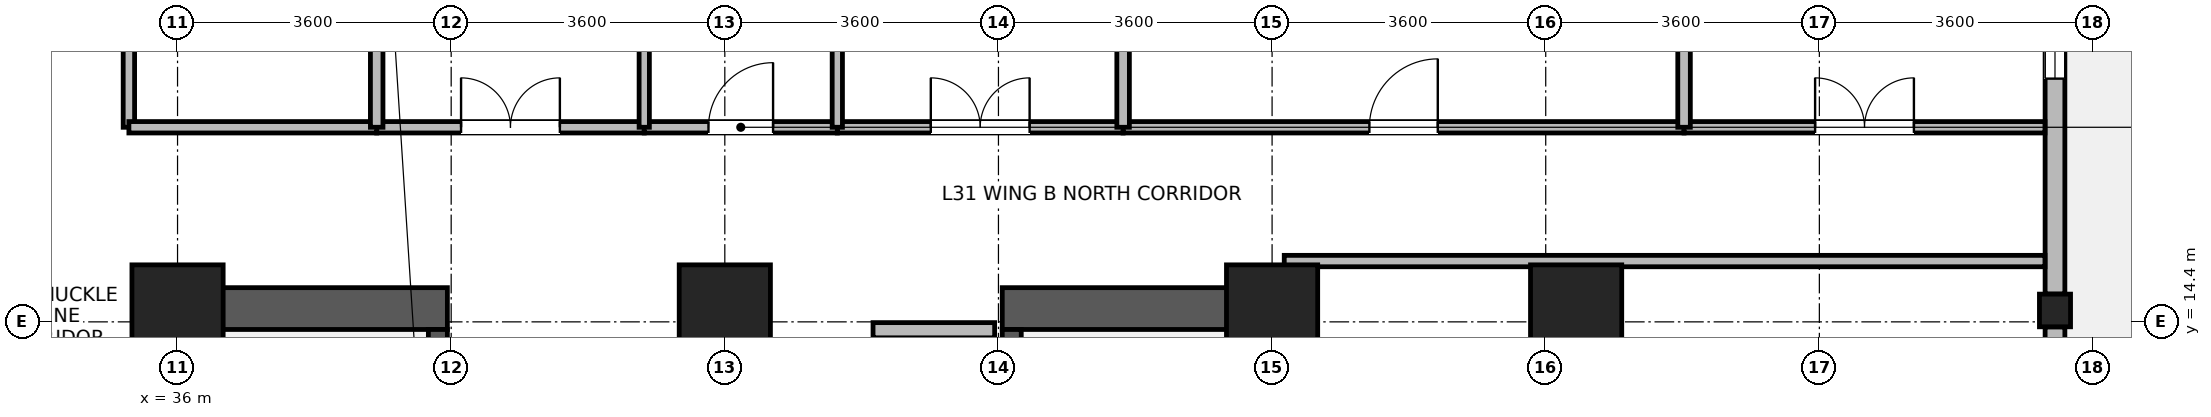
"""IFC4 building model, lengths in metres.
Left out: names, types, materials, properties, quantities, classifications, styles, units other than length and angle.
Written with IfcOpenShell. Run it as: python <this file> out.ifc"""

import sys

from ifc_helpers import new_model, si_unit, direction, frame, frame_2d, origin, origin_2d, place, context, subcontext, project, spatial, rectangle, i_section, extrude, source, transform, mapped, element, fill, save


model = new_model("IFC4")
c1 = context("Model", 3, precision=1e-05, world=origin(), true_north=direction((0.0, 1.0)))
c2 = subcontext(c1, "Body", "Model", "MODEL_VIEW")
j1 = project(units=[si_unit("LENGTHUNIT", "METRE"), si_unit("PLANEANGLEUNIT", "RADIAN")], contexts=[c1])
p1 = place(None, origin())
s1 = spatial("IfcSite", under=j1, at=p1, CompositionType="ELEMENT")
p2 = place(p1, origin())
s2 = spatial("IfcBuilding", under=s1, at=p2, CompositionType="ELEMENT")
p3 = place(p2, frame((0.0, 0.0, 123.0)))
s3 = spatial("IfcBuildingStorey", under=s2, at=p3, CompositionType="ELEMENT", Elevation=123.0)
for number, where, z_axis, x_axis in (
    (1, (36.075, 6.75, 0.0), (0.0, 0.0, 1.0), (0.0, 1.0, 0.0)),
    (2, (50.325, 6.75, 0.0), (0.0, 0.0, 1.0), (0.0, 1.0, 0.0)),
):
    element("IfcWall", number, at=place(p3, frame(where, z_axis=z_axis, x_axis=x_axis)), inside=s3, PredefinedType="SHEAR", context=c2, shape_type="SweptSolid", body=[
        extrude(rectangle(XDim=8.1, YDim=0.55, at=frame_2d((4.05, 0.0))), origin(), (0.0, 0.0, 1.0), 3.45),
    ])
for number, where, z_axis, x_axis in (
    (3, (36.35, 14.575, 0.0), (0.0, 0.0, 1.0), (1.0, 0.0, 0.0)),
    (4, (46.85, 14.575, 0.0), (0.0, 0.0, 1.0), (1.0, 0.0, 0.0)),
):
    element("IfcWall", number, at=place(p3, frame(where, z_axis=z_axis, x_axis=x_axis)), inside=s3, PredefinedType="SHEAR", context=c2, shape_type="SweptSolid", body=[
        extrude(rectangle(XDim=3.2, YDim=0.55, at=frame_2d((1.6, 0.0))), origin(), (0.0, 0.0, 1.0), 3.45),
    ])
p4 = place(p3, frame((39.425, 7.3, 0.0), z_axis=(0.0, 0.0, 1.0), x_axis=(0.0, 1.0, 0.0)))
e5 = element("IfcWall", 5, at=p4, inside=s3, PredefinedType="SHEAR", context=c2, shape_type="SweptSolid", body=[
    extrude(rectangle(XDim=7.0, YDim=0.25, at=frame_2d((3.5, 0.0))), origin(), (0.0, 0.0, 1.0), 3.45),
])
p5 = place(p4, frame((0.15, 0.0, 0.0)))
e6 = element("IfcOpeningElement", 6, at=p5, cuts=e5, PredefinedType="OPENING", context=c2, shape_type="SweptSolid", body=[
    extrude(rectangle(XDim=1.1, YDim=2.08, at=frame_2d((0.55, 1.04))), frame((0.0, 0.135, 0.0), z_axis=(0.0, -1.0, 0.0), x_axis=(1.0, 0.0, 0.0)), (0.0, 0.0, 1.0), 0.27),
])
p6 = place(p3, frame((46.975, 7.3, 0.0), z_axis=(0.0, 0.0, 1.0), x_axis=(0.0, 1.0, 0.0)))
e7 = element("IfcWall", 7, at=p6, inside=s3, PredefinedType="SHEAR", context=c2, shape_type="SweptSolid", body=[
    extrude(rectangle(XDim=7.0, YDim=0.25, at=frame_2d((3.5, 0.0))), origin(), (0.0, 0.0, 1.0), 3.45),
])
p7 = place(p6, frame((0.15, 0.0, 0.0)))
e8 = element("IfcOpeningElement", 8, at=p7, cuts=e7, PredefinedType="OPENING", context=c2, shape_type="SweptSolid", body=[
    extrude(rectangle(XDim=1.1, YDim=2.08, at=frame_2d((0.55, 1.04))), frame((0.0, 0.135, 0.0), z_axis=(0.0, -1.0, 0.0), x_axis=(1.0, 0.0, 0.0)), (0.0, 0.0, 1.0), 0.27),
])
m1 = source(origin(), c2, "Body", "SweptSolid", [
    extrude(rectangle(XDim=1.2, YDim=1.2, at=origin_2d()), origin(), (0.0, 0.0, 1.0), 3.7),
])
for number, where, z_axis, x_axis in (
    (9, (36.0, 14.55, 0.0), (0.0, 0.0, 1.0), (1.0, 0.0, 0.0)),
    (10, (43.2, 14.55, 0.0), (0.0, 0.0, 1.0), (1.0, 0.0, 0.0)),
    (11, (50.4, 14.55, 0.0), (0.0, 0.0, 1.0), (1.0, 0.0, 0.0)),
    (12, (54.4, 14.55, 0.0), (0.0, 0.0, 1.0), (1.0, 0.0, 0.0)),
):
    element("IfcColumn", number, at=place(p3, frame(where, z_axis=z_axis, x_axis=x_axis)), inside=s3, PredefinedType="COLUMN", context=c2, shape_type="MappedRepresentation", body=[
        mapped(m1, transform((0.0, 0.0, 0.0), x_axis=(1.0, 0.0, 0.0), y_axis=(0.0, 1.0, 0.0), z_axis=(0.0, 0.0, 1.0), scale=1.0)),
    ])
m2 = source(origin(), c2, "Body", "SweptSolid", [
    extrude(i_section(OverallWidth=0.409, OverallDepth=0.43, WebThickness=0.024, FlangeThickness=0.033, FilletRadius=0.015, at=origin_2d()), origin(), (0.0, 0.0, 1.0), 3.7),
])
p8 = place(p3, frame((60.7, 14.55, 0.0), z_axis=(0.0, 0.0, 1.0), x_axis=(1.0, 0.0, 0.0)))
e13 = element("IfcColumn", 13, at=p8, inside=s3, PredefinedType="COLUMN", context=c2, shape_type="MappedRepresentation", body=[
    mapped(m2, transform((0.0, 0.0, 0.0), x_axis=(1.0, 0.0, 0.0), y_axis=(0.0, 1.0, 0.0), z_axis=(0.0, 0.0, 1.0), scale=1.0)),
])
p9 = place(p3, frame((60.7, 14.334, 0.0), z_axis=(0.0, 0.0, 1.0), x_axis=(0.0, -1.0, 0.0)))
e14 = element("IfcWall", 14, at=p9, inside=s3, PredefinedType="STANDARD", context=c2, shape_type="SweptSolid", body=[
    extrude(rectangle(XDim=7.068, YDim=0.26, at=frame_2d((3.534, 0.0))), origin(), (0.0, 0.0, 1.0), 2.98),
])
p10 = place(p9, frame((2.784, 0.0, 0.0)))
e15 = element("IfcOpeningElement", 15, at=p10, cuts=e14, PredefinedType="OPENING", context=c2, shape_type="SweptSolid", body=[
    extrude(rectangle(XDim=1.5, YDim=2.15, at=frame_2d((0.75, 1.075))), frame((0.0, 0.14, 0.0), z_axis=(0.0, -1.0, 0.0), x_axis=(1.0, 0.0, 0.0)), (0.0, 0.0, 1.0), 0.28),
])
p11 = place(p9, frame((1.017, 0.0, 0.85)))
e16 = element("IfcOpeningElement", 16, at=p11, cuts=e14, PredefinedType="OPENING", context=c2, shape_type="SweptSolid", body=[
    extrude(rectangle(XDim=1.5, YDim=1.85, at=frame_2d((0.75, 0.925))), frame((0.0, 0.14, 0.0), z_axis=(0.0, -1.0, 0.0), x_axis=(1.0, 0.0, 0.0)), (0.0, 0.0, 1.0), 0.28),
])
p12 = place(p9, frame((4.551, 0.0, 0.85)))
e17 = element("IfcOpeningElement", 17, at=p12, cuts=e14, PredefinedType="OPENING", context=c2, shape_type="SweptSolid", body=[
    extrude(rectangle(XDim=1.5, YDim=1.85, at=frame_2d((0.75, 0.925))), frame((0.0, 0.14, 0.0), z_axis=(0.0, -1.0, 0.0), x_axis=(1.0, 0.0, 0.0)), (0.0, 0.0, 1.0), 0.28),
])
p13 = place(p3, frame((60.7, 21.384, 0.0), z_axis=(0.0, 0.0, 1.0), x_axis=(0.0, -1.0, 0.0)))
e18 = element("IfcWall", 18, at=p13, inside=s3, PredefinedType="STANDARD", context=c2, shape_type="SweptSolid", body=[
    extrude(rectangle(XDim=6.618, YDim=0.26, at=frame_2d((3.309, 0.0))), origin(), (0.0, 0.0, 1.0), 2.98),
])
p14 = place(p13, frame((0.905, 0.0, 0.85)))
e19 = element("IfcOpeningElement", 19, at=p14, cuts=e18, PredefinedType="OPENING", context=c2, shape_type="SweptSolid", body=[
    extrude(rectangle(XDim=1.5, YDim=1.85, at=frame_2d((0.75, 0.925))), frame((0.0, 0.14, 0.0), z_axis=(0.0, -1.0, 0.0), x_axis=(1.0, 0.0, 0.0)), (0.0, 0.0, 1.0), 0.28),
])
p15 = place(p13, frame((2.834, 0.0, 0.85)))
e20 = element("IfcOpeningElement", 20, at=p15, cuts=e18, PredefinedType="OPENING", context=c2, shape_type="SweptSolid", body=[
    extrude(rectangle(XDim=0.95, YDim=1.75, at=frame_2d((0.475, 0.875))), frame((0.0, 0.14, 0.0), z_axis=(0.0, -1.0, 0.0), x_axis=(1.0, 0.0, 0.0)), (0.0, 0.0, 1.0), 0.28),
])
p16 = place(p3, frame((45.15, 14.29, 0.0), z_axis=(0.0, 0.0, 1.0), x_axis=(1.0, 0.0, 0.0)))
e21 = element("IfcWall", 21, at=p16, inside=s3, PredefinedType="PARTITIONING", context=c2, shape_type="SweptSolid", body=[
    extrude(rectangle(XDim=1.6, YDim=0.2, at=frame_2d((0.8, 0.0))), origin(), (0.0, 0.0, 1.0), 2.43),
])
p17 = place(p3, frame((50.56, 15.2, 0.0), z_axis=(0.0, 0.0, 1.0), x_axis=(1.0, 0.0, 0.0)))
e22 = element("IfcWall", 22, at=p17, inside=s3, PredefinedType="PARTITIONING", context=c2, shape_type="SweptSolid", body=[
    extrude(rectangle(XDim=10.008, YDim=0.15, at=frame_2d((5.004, 0.0))), origin(), (0.0, 0.0, 1.0), 3.43),
])
p18 = place(p3, frame((35.36, 16.96, 0.0), z_axis=(0.0, 0.0, 1.0), x_axis=(0.0, 1.0, 0.0)))
e23 = element("IfcWall", 23, at=p18, inside=s3, PredefinedType="PARTITIONING", context=c2, shape_type="SweptSolid", body=[
    extrude(rectangle(XDim=9.64, YDim=0.15, at=frame_2d((4.82, 0.0))), origin(), (0.0, 0.0, 1.0), 3.43),
])
p19 = place(p18, frame((2.435, 0.0, 0.0)))
e24 = element("IfcOpeningElement", 24, at=p19, cuts=e23, PredefinedType="OPENING", context=c2, shape_type="SweptSolid", body=[
    extrude(rectangle(XDim=1.3, YDim=2.12, at=frame_2d((0.65, 1.06))), frame((0.0, 0.085, 0.0), z_axis=(0.0, -1.0, 0.0), x_axis=(1.0, 0.0, 0.0)), (0.0, 0.0, 1.0), 0.17),
])
p20 = place(p3, frame((48.44, 16.96, 0.0), z_axis=(0.0, 0.0, 1.0), x_axis=(1.0, 0.0, 0.0)))
e25 = element("IfcWall", 25, at=p20, inside=s3, PredefinedType="PARTITIONING", context=c2, shape_type="SweptSolid", body=[
    extrude(rectangle(XDim=7.38, YDim=0.15, at=frame_2d((3.69, 0.0))), origin(), (0.0, 0.0, 1.0), 3.43),
])
p21 = place(p20, frame((3.24, 0.0, 0.0)))
e26 = element("IfcOpeningElement", 26, at=p21, cuts=e25, PredefinedType="OPENING", context=c2, shape_type="SweptSolid", body=[
    extrude(rectangle(XDim=0.9, YDim=2.08, at=frame_2d((0.45, 1.04))), frame((0.0, 0.085, 0.0), z_axis=(0.0, -1.0, 0.0), x_axis=(1.0, 0.0, 0.0)), (0.0, 0.0, 1.0), 0.17),
])
p22 = place(p3, frame((55.82, 16.96, 0.0), z_axis=(0.0, 0.0, 1.0), x_axis=(1.0, 0.0, 0.0)))
e27 = element("IfcWall", 27, at=p22, inside=s3, PredefinedType="PARTITIONING", context=c2, shape_type="SweptSolid", body=[
    extrude(rectangle(XDim=4.748, YDim=0.15, at=frame_2d((2.374, 0.0))), origin(), (0.0, 0.0, 1.0), 3.43),
])
p23 = place(p22, frame((1.724, 0.0, 0.0)))
e28 = element("IfcOpeningElement", 28, at=p23, cuts=e27, PredefinedType="OPENING", context=c2, shape_type="SweptSolid", body=[
    extrude(rectangle(XDim=1.3, YDim=2.12, at=frame_2d((0.65, 1.06))), frame((0.0, 0.085, 0.0), z_axis=(0.0, -1.0, 0.0), x_axis=(1.0, 0.0, 0.0)), (0.0, 0.0, 1.0), 0.17),
])
p24 = place(p3, frame((44.68, 16.96, 0.0), z_axis=(0.0, 0.0, 1.0), x_axis=(1.0, 0.0, 0.0)))
e29 = element("IfcWall", 29, at=p24, inside=s3, PredefinedType="PARTITIONING", context=c2, shape_type="SweptSolid", body=[
    extrude(rectangle(XDim=3.76, YDim=0.15, at=frame_2d((1.88, 0.0))), origin(), (0.0, 0.0, 1.0), 3.43),
])
p25 = place(p24, frame((1.23, 0.0, 0.0)))
e30 = element("IfcOpeningElement", 30, at=p25, cuts=e29, PredefinedType="OPENING", context=c2, shape_type="SweptSolid", body=[
    extrude(rectangle(XDim=1.3, YDim=2.12, at=frame_2d((0.65, 1.06))), frame((0.0, 0.085, 0.0), z_axis=(0.0, -1.0, 0.0), x_axis=(1.0, 0.0, 0.0)), (0.0, 0.0, 1.0), 0.17),
])
p26 = place(p3, frame((38.62, 16.96, 0.0), z_axis=(0.0, 0.0, 1.0), x_axis=(1.0, 0.0, 0.0)))
e31 = element("IfcWall", 31, at=p26, inside=s3, PredefinedType="PARTITIONING", context=c2, shape_type="SweptSolid", body=[
    extrude(rectangle(XDim=3.52, YDim=0.15, at=frame_2d((1.76, 0.0))), origin(), (0.0, 0.0, 1.0), 3.43),
])
p27 = place(p26, frame((1.11, 0.0, 0.0)))
e32 = element("IfcOpeningElement", 32, at=p27, cuts=e31, PredefinedType="OPENING", context=c2, shape_type="SweptSolid", body=[
    extrude(rectangle(XDim=1.3, YDim=2.12, at=frame_2d((0.65, 1.06))), frame((0.0, 0.085, 0.0), z_axis=(0.0, -1.0, 0.0), x_axis=(1.0, 0.0, 0.0)), (0.0, 0.0, 1.0), 0.17),
])
p28 = place(p3, frame((35.36, 16.96, 0.0), z_axis=(0.0, 0.0, 1.0), x_axis=(1.0, 0.0, 0.0)))
e33 = element("IfcWall", 33, at=p28, inside=s3, PredefinedType="PARTITIONING", context=c2, shape_type="SweptSolid", body=[
    extrude(rectangle(XDim=3.26, YDim=0.15, at=frame_2d((1.63, 0.0))), origin(), (0.0, 0.0, 1.0), 3.43),
])
p29 = place(p3, frame((42.14, 16.96, 0.0), z_axis=(0.0, 0.0, 1.0), x_axis=(1.0, 0.0, 0.0)))
e34 = element("IfcWall", 34, at=p29, inside=s3, PredefinedType="PARTITIONING", context=c2, shape_type="SweptSolid", body=[
    extrude(rectangle(XDim=2.54, YDim=0.15, at=frame_2d((1.27, 0.0))), origin(), (0.0, 0.0, 1.0), 3.43),
])
p30 = place(p29, frame((0.845, 0.0, 0.0)))
e35 = element("IfcOpeningElement", 35, at=p30, cuts=e34, PredefinedType="OPENING", context=c2, shape_type="SweptSolid", body=[
    extrude(rectangle(XDim=0.85, YDim=2.04, at=frame_2d((0.425, 1.02))), frame((0.0, 0.085, 0.0), z_axis=(0.0, -1.0, 0.0), x_axis=(1.0, 0.0, 0.0)), (0.0, 0.0, 1.0), 0.17),
])
p31 = place(p3, frame((38.62, 16.96, 0.0), z_axis=(0.0, 0.0, 1.0), x_axis=(0.0, 1.0, 0.0)))
e36 = element("IfcWall", 36, at=p31, inside=s3, PredefinedType="PARTITIONING", context=c2, shape_type="SweptSolid", body=[
    extrude(rectangle(XDim=9.64, YDim=0.165, at=frame_2d((4.82, 0.0))), origin(), (0.0, 0.0, 1.0), 3.43),
])
for number, where, z_axis, x_axis in (
    (37, (42.14, 16.96, 0.0), (0.0, 0.0, 1.0), (0.0, 1.0, 0.0)),
    (38, (44.68, 16.96, 0.0), (0.0, 0.0, 1.0), (0.0, 1.0, 0.0)),
):
    element("IfcWall", number, at=place(p3, frame(where, z_axis=z_axis, x_axis=x_axis)), inside=s3, PredefinedType="PARTITIONING", context=c2, shape_type="SweptSolid", body=[
        extrude(rectangle(XDim=9.64, YDim=0.135, at=frame_2d((4.82, 0.0))), origin(), (0.0, 0.0, 1.0), 3.43),
    ])
for number, where, z_axis, x_axis in (
    (39, (48.44, 16.96, 0.0), (0.0, 0.0, 1.0), (0.0, 1.0, 0.0)),
    (40, (55.82, 16.96, 0.0), (0.0, 0.0, 1.0), (0.0, 1.0, 0.0)),
):
    element("IfcWall", number, at=place(p3, frame(where, z_axis=z_axis, x_axis=x_axis)), inside=s3, PredefinedType="PARTITIONING", context=c2, shape_type="SweptSolid", body=[
        extrude(rectangle(XDim=9.64, YDim=0.165, at=frame_2d((4.82, 0.0))), origin(), (0.0, 0.0, 1.0), 3.43),
    ])
p32 = place(p15, origin())
e41 = element("IfcWindow", 41, at=p32, inside=s3, PartitioningType="SINGLE_PANEL", PredefinedType="WINDOW", context=c2, shape_type="SweptSolid", body=[
    extrude(rectangle(XDim=0.95, YDim=1.75, at=frame_2d((0.475, 0.875))), frame((0.0, 0.03, 0.0), z_axis=(0.0, -1.0, 0.0), x_axis=(1.0, 0.0, 0.0)), (0.0, 0.0, 1.0), 0.06),
])
fill(e20, e41)
p33 = place(p21, origin())
e42 = element("IfcDoor", 42, at=p33, inside=s3, OperationType="SINGLE_SWING_RIGHT", PredefinedType="DOOR", context=c2, shape_type="SweptSolid", body=[
    extrude(rectangle(XDim=0.9, YDim=2.08, at=frame_2d((0.45, 1.04))), frame((0.0, 0.025, 0.0), z_axis=(0.0, -1.0, 0.0), x_axis=(1.0, 0.0, 0.0)), (0.0, 0.0, 1.0), 0.05),
])
fill(e26, e42)
p34 = place(p23, origin())
e43 = element("IfcDoor", 43, at=p34, inside=s3, OperationType="DOUBLE_DOOR_SINGLE_SWING", PredefinedType="DOOR", context=c2, shape_type="SweptSolid", body=[
    extrude(rectangle(XDim=1.3, YDim=2.12, at=frame_2d((0.65, 1.06))), frame((0.0, 0.025, 0.0), z_axis=(0.0, -1.0, 0.0), x_axis=(1.0, 0.0, 0.0)), (0.0, 0.0, 1.0), 0.05),
])
fill(e28, e43)
p35 = place(p25, origin())
e44 = element("IfcDoor", 44, at=p35, inside=s3, OperationType="DOUBLE_DOOR_SINGLE_SWING", PredefinedType="DOOR", context=c2, shape_type="SweptSolid", body=[
    extrude(rectangle(XDim=1.3, YDim=2.12, at=frame_2d((0.65, 1.06))), frame((0.0, 0.025, 0.0), z_axis=(0.0, -1.0, 0.0), x_axis=(1.0, 0.0, 0.0)), (0.0, 0.0, 1.0), 0.05),
])
fill(e30, e44)
p36 = place(p27, origin())
e45 = element("IfcDoor", 45, at=p36, inside=s3, OperationType="DOUBLE_DOOR_SINGLE_SWING", PredefinedType="DOOR", context=c2, shape_type="SweptSolid", body=[
    extrude(rectangle(XDim=1.3, YDim=2.12, at=frame_2d((0.65, 1.06))), frame((0.0, 0.025, 0.0), z_axis=(0.0, -1.0, 0.0), x_axis=(1.0, 0.0, 0.0)), (0.0, 0.0, 1.0), 0.05),
])
fill(e32, e45)
p37 = place(p30, origin())
e46 = element("IfcDoor", 46, at=p37, inside=s3, OperationType="SINGLE_SWING_RIGHT", PredefinedType="DOOR", context=c2, shape_type="SweptSolid", body=[
    extrude(rectangle(XDim=0.85, YDim=2.04, at=frame_2d((0.425, 1.02))), frame((0.0, 0.025, 0.0), z_axis=(0.0, -1.0, 0.0), x_axis=(1.0, 0.0, 0.0)), (0.0, 0.0, 1.0), 0.05),
])
fill(e35, e46)
save(model, sys.argv[1])
